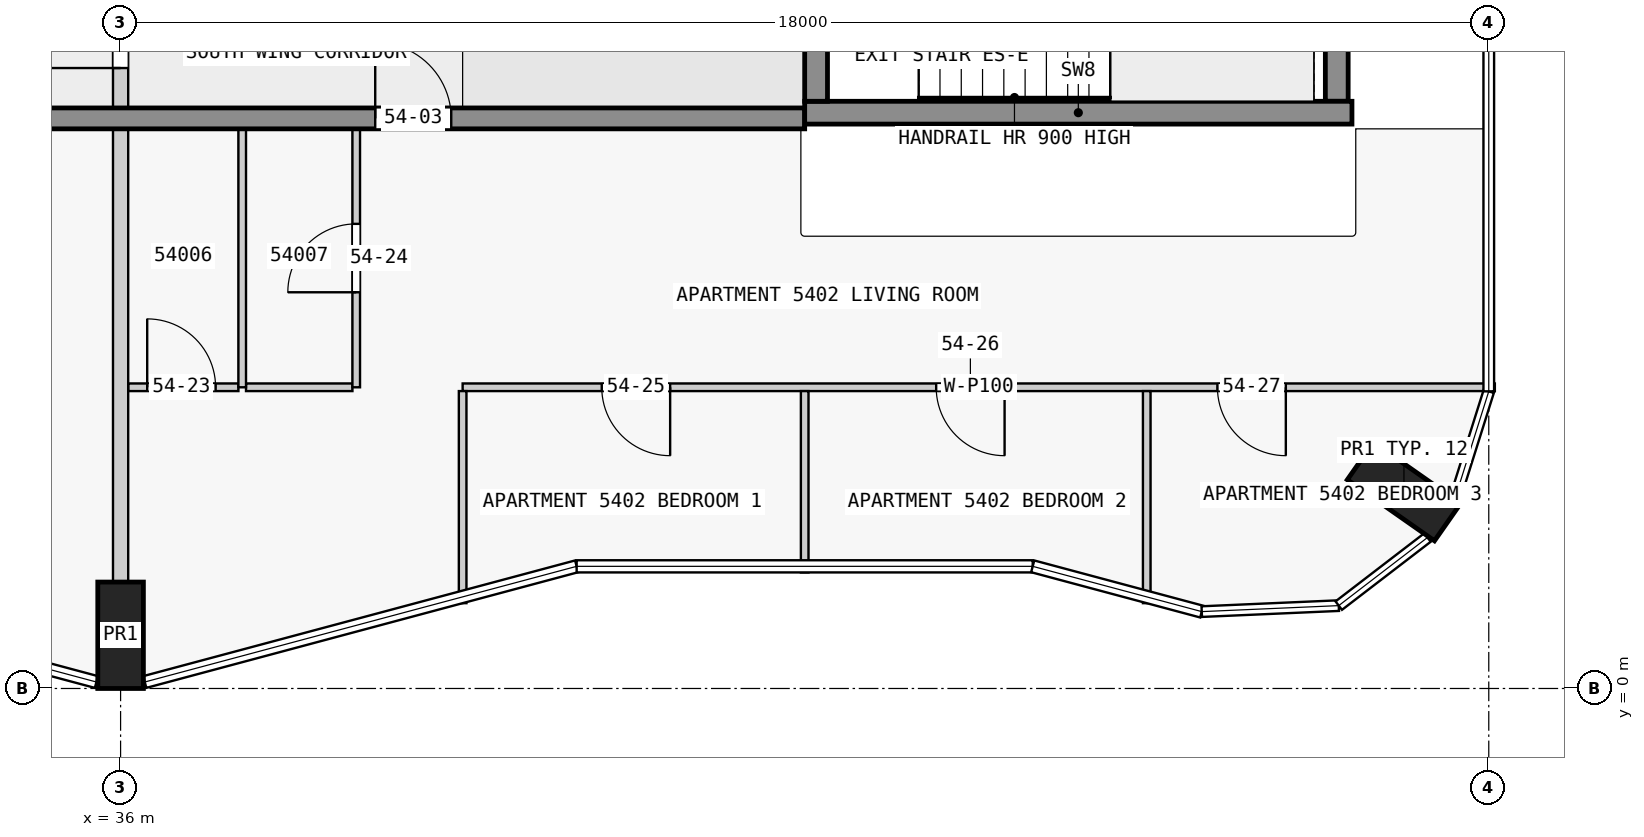
"""IFC4 building model, lengths in metres.
Left out: names, types, materials, properties, quantities, classifications, styles, units other than length and angle.
Written with IfcOpenShell. Run it as: python <this file> out.ifc"""

import sys

from ifc_helpers import new_model, si_unit, direction, frame, frame_2d, origin, origin_2d, place, context, subcontext, project, spatial, rectangle, extrude, element, fill, save


model = new_model("IFC4")
c1 = context("Model", 3, precision=1e-05, world=origin(), true_north=direction((0.0, 1.0)))
c2 = subcontext(c1, "Body", "Model", "MODEL_VIEW")
j1 = project(units=[si_unit("LENGTHUNIT", "METRE"), si_unit("PLANEANGLEUNIT", "RADIAN")], contexts=[c1])
p1 = place(None, origin())
s1 = spatial("IfcSite", under=j1, at=p1, CompositionType="ELEMENT")
p2 = place(p1, origin())
s2 = spatial("IfcBuilding", under=s1, at=p2, CompositionType="ELEMENT")
p3 = place(p2, frame((0.0, 0.0, 208.4)))
s3 = spatial("IfcBuildingStorey", under=s2, at=p3, CompositionType="ELEMENT", Elevation=208.4)
for number, where, z_axis, x_axis in (
    (1, (36.0, 0.7, 0.0), (0.0, 0.0, 1.0), (1.0, 0.0, 0.0)),
    (2, (52.884, 2.59, 0.0), (0.0, 0.0, 1.0), (0.574, 0.819, 0.0)),
):
    element("IfcColumn", number, at=place(p3, frame(where, z_axis=z_axis, x_axis=x_axis)), inside=s3, PredefinedType="COLUMN", context=c2, shape_type="SweptSolid", body=[
        extrude(rectangle(XDim=0.6, YDim=1.4, at=origin_2d()), origin(), (0.0, 0.0, 1.0), 3.5),
    ])
p4 = place(p3, frame((45.15, 7.725, 0.0), z_axis=(0.0, 0.0, 1.0), x_axis=(0.0, 1.0, 0.0)))
e3 = element("IfcWall", 3, at=p4, inside=s3, PredefinedType="SHEAR", context=c2, shape_type="SweptSolid", body=[
    extrude(rectangle(XDim=2.55, YDim=0.3, at=frame_2d((1.275, 0.0))), origin(), (0.0, 0.0, 1.0), 3.5),
])
p5 = place(p4, frame((0.725, 0.0, 0.0)))
e4 = element("IfcOpeningElement", 4, at=p5, cuts=e3, PredefinedType="OPENING", context=c2, shape_type="SweptSolid", body=[
    extrude(rectangle(XDim=1.1, YDim=2.1, at=frame_2d((0.55, 1.05))), frame((0.0, 0.16, 0.0), z_axis=(0.0, -1.0, 0.0), x_axis=(1.0, 0.0, 0.0)), (0.0, 0.0, 1.0), 0.32),
])
p6 = place(p3, frame((52.0, 7.725, 0.0), z_axis=(0.0, 0.0, 1.0), x_axis=(0.0, 1.0, 0.0)))
e5 = element("IfcWall", 5, at=p6, inside=s3, PredefinedType="SHEAR", context=c2, shape_type="SweptSolid", body=[
    extrude(rectangle(XDim=2.55, YDim=0.3, at=frame_2d((1.275, 0.0))), origin(), (0.0, 0.0, 1.0), 3.5),
])
p7 = place(p3, frame((45.0, 7.575, 0.0), z_axis=(0.0, 0.0, 1.0), x_axis=(1.0, 0.0, 0.0)))
e6 = element("IfcWall", 6, at=p7, inside=s3, PredefinedType="SHEAR", context=c2, shape_type="SweptSolid", body=[
    extrude(rectangle(XDim=7.2, YDim=0.3, at=frame_2d((3.6, 0.0))), origin(), (0.0, 0.0, 1.0), 3.5),
])
p8 = place(p3, frame((22.5, 7.5, 0.0), z_axis=(0.0, 0.0, 1.0), x_axis=(1.0, 0.0, 0.0)))
e7 = element("IfcWall", 7, at=p8, inside=s3, PredefinedType="SHEAR", context=c2, shape_type="SweptSolid", body=[
    extrude(rectangle(XDim=22.5, YDim=0.275, at=frame_2d((11.25, 0.0))), origin(), (0.0, 0.0, 1.0), 3.25),
])
p9 = place(p8, frame((4.05, 0.0, 0.0)))
e8 = element("IfcOpeningElement", 8, at=p9, cuts=e7, PredefinedType="OPENING", context=c2, shape_type="SweptSolid", body=[
    extrude(rectangle(XDim=1.0, YDim=2.1, at=frame_2d((0.5, 1.05))), frame((0.0, 0.147, 0.0), z_axis=(0.0, -1.0, 0.0), x_axis=(1.0, 0.0, 0.0)), (0.0, 0.0, 1.0), 0.295),
])
p10 = place(p8, frame((10.35, 0.0, 0.0)))
e9 = element("IfcOpeningElement", 9, at=p10, cuts=e7, PredefinedType="OPENING", context=c2, shape_type="SweptSolid", body=[
    extrude(rectangle(XDim=1.8, YDim=2.1, at=frame_2d((0.9, 1.05))), frame((0.0, 0.147, 0.0), z_axis=(0.0, -1.0, 0.0), x_axis=(1.0, 0.0, 0.0)), (0.0, 0.0, 1.0), 0.295),
])
p11 = place(p8, frame((16.85, 0.0, 0.0)))
e10 = element("IfcOpeningElement", 10, at=p11, cuts=e7, PredefinedType="OPENING", context=c2, shape_type="SweptSolid", body=[
    extrude(rectangle(XDim=1.0, YDim=2.1, at=frame_2d((0.5, 1.05))), frame((0.0, 0.147, 0.0), z_axis=(0.0, -1.0, 0.0), x_axis=(1.0, 0.0, 0.0)), (0.0, 0.0, 1.0), 0.295),
])
p12 = place(p3, frame((54.08, 3.962, 0.0), z_axis=(0.0, 0.0, 1.0), x_axis=(-1.0, 0.0, 0.0)))
e11 = element("IfcWall", 11, at=p12, inside=s3, PredefinedType="PARTITIONING", context=c2, shape_type="SweptSolid", body=[
    extrude(rectangle(XDim=13.58, YDim=0.1, at=frame_2d((6.79, 0.0))), origin(), (0.0, 0.0, 1.0), 3.25),
])
p13 = place(p12, frame((10.85, 0.0, 0.0)))
e12 = element("IfcOpeningElement", 12, at=p13, cuts=e11, PredefinedType="OPENING", context=c2, shape_type="SweptSolid", body=[
    extrude(rectangle(XDim=0.9, YDim=2.1, at=frame_2d((0.45, 1.05))), frame((0.0, 0.06, 0.0), z_axis=(0.0, -1.0, 0.0), x_axis=(1.0, 0.0, 0.0)), (0.0, 0.0, 1.0), 0.12),
])
p14 = place(p12, frame((6.45, 0.0, 0.0)))
e13 = element("IfcOpeningElement", 13, at=p14, cuts=e11, PredefinedType="OPENING", context=c2, shape_type="SweptSolid", body=[
    extrude(rectangle(XDim=0.9, YDim=2.1, at=frame_2d((0.45, 1.05))), frame((0.0, 0.06, 0.0), z_axis=(0.0, -1.0, 0.0), x_axis=(1.0, 0.0, 0.0)), (0.0, 0.0, 1.0), 0.12),
])
p15 = place(p12, frame((2.75, 0.0, 0.0)))
e14 = element("IfcOpeningElement", 14, at=p15, cuts=e11, PredefinedType="OPENING", context=c2, shape_type="SweptSolid", body=[
    extrude(rectangle(XDim=0.9, YDim=2.1, at=frame_2d((0.45, 1.05))), frame((0.0, 0.06, 0.0), z_axis=(0.0, -1.0, 0.0), x_axis=(1.0, 0.0, 0.0)), (0.0, 0.0, 1.0), 0.12),
])
p16 = place(p3, frame((36.1, 3.962, 0.0), z_axis=(0.0, 0.0, 1.0), x_axis=(1.0, 0.0, 0.0)))
e15 = element("IfcWall", 15, at=p16, inside=s3, PredefinedType="PARTITIONING", context=c2, shape_type="SweptSolid", body=[
    extrude(rectangle(XDim=1.45, YDim=0.1, at=frame_2d((0.725, 0.0))), origin(), (0.0, 0.0, 1.0), 3.25),
])
p17 = place(p16, frame((0.25, 0.0, 0.0)))
e16 = element("IfcOpeningElement", 16, at=p17, cuts=e15, PredefinedType="OPENING", context=c2, shape_type="SweptSolid", body=[
    extrude(rectangle(XDim=0.9, YDim=2.1, at=frame_2d((0.45, 1.05))), frame((0.0, 0.06, 0.0), z_axis=(0.0, -1.0, 0.0), x_axis=(1.0, 0.0, 0.0)), (0.0, 0.0, 1.0), 0.12),
])
p18 = place(p3, frame((37.65, 3.962, 0.0), z_axis=(0.0, 0.0, 1.0), x_axis=(1.0, 0.0, 0.0)))
e17 = element("IfcWall", 17, at=p18, inside=s3, PredefinedType="PARTITIONING", context=c2, shape_type="SweptSolid", body=[
    extrude(rectangle(XDim=1.4, YDim=0.1, at=frame_2d((0.7, 0.0))), origin(), (0.0, 0.0, 1.0), 3.25),
])
p19 = place(p3, frame((36.0, 1.4, 0.0), z_axis=(0.0, 0.0, 1.0), x_axis=(0.0, 1.0, 0.0)))
e18 = element("IfcWall", 18, at=p19, inside=s3, PredefinedType="PARTITIONING", context=c2, shape_type="SweptSolid", body=[
    extrude(rectangle(XDim=5.963, YDim=0.2, at=frame_2d((2.981, 0.0))), origin(), (0.0, 0.0, 1.0), 3.25),
])
p20 = place(p3, frame((37.6, 3.962, 0.0), z_axis=(0.0, 0.0, 1.0), x_axis=(0.0, 1.0, 0.0)))
e19 = element("IfcWall", 19, at=p20, inside=s3, PredefinedType="PARTITIONING", context=c2, shape_type="SweptSolid", body=[
    extrude(rectangle(XDim=3.4, YDim=0.1, at=frame_2d((1.7, 0.0))), origin(), (0.0, 0.0, 1.0), 3.25),
])
p21 = place(p3, frame((39.1, 3.962, 0.0), z_axis=(0.0, 0.0, 1.0), x_axis=(0.0, 1.0, 0.0)))
e20 = element("IfcWall", 20, at=p21, inside=s3, PredefinedType="PARTITIONING", context=c2, shape_type="SweptSolid", body=[
    extrude(rectangle(XDim=3.4, YDim=0.1, at=frame_2d((1.7, 0.0))), origin(), (0.0, 0.0, 1.0), 3.25),
])
p22 = place(p21, frame((1.25, 0.0, 0.0)))
e21 = element("IfcOpeningElement", 21, at=p22, cuts=e20, PredefinedType="OPENING", context=c2, shape_type="SweptSolid", body=[
    extrude(rectangle(XDim=0.9, YDim=2.1, at=frame_2d((0.45, 1.05))), frame((0.0, 0.06, 0.0), z_axis=(0.0, -1.0, 0.0), x_axis=(1.0, 0.0, 0.0)), (0.0, 0.0, 1.0), 0.12),
])
p23 = place(p3, frame((40.5, 3.913, 0.0), z_axis=(0.0, 0.0, 1.0), x_axis=(0.0, -1.0, 0.0)))
e22 = element("IfcWall", 22, at=p23, inside=s3, PredefinedType="PARTITIONING", context=c2, shape_type="SweptSolid", body=[
    extrude(rectangle(XDim=2.79, YDim=0.1, at=frame_2d((1.395, 0.0))), origin(), (0.0, 0.0, 1.0), 3.25),
])
p24 = place(p3, frame((45.0, 1.527, 0.0), z_axis=(0.0, 0.0, 1.0), x_axis=(0.0, 1.0, 0.0)))
e23 = element("IfcWall", 23, at=p24, inside=s3, PredefinedType="PARTITIONING", context=c2, shape_type="SweptSolid", body=[
    extrude(rectangle(XDim=2.386, YDim=0.1, at=frame_2d((1.193, 0.0))), origin(), (0.0, 0.0, 1.0), 3.25),
])
p25 = place(p3, frame((49.5, 1.122, 0.0), z_axis=(0.0, 0.0, 1.0), x_axis=(0.0, 1.0, 0.0)))
e24 = element("IfcWall", 24, at=p25, inside=s3, PredefinedType="PARTITIONING", context=c2, shape_type="SweptSolid", body=[
    extrude(rectangle(XDim=2.79, YDim=0.1, at=frame_2d((1.395, 0.0))), origin(), (0.0, 0.0, 1.0), 3.25),
])
p26 = place(p3, frame((36.0, 7.462, 0.0), z_axis=(0.0, 0.0, 1.0), x_axis=(0.0, 1.0, 0.0)))
e25 = element("IfcWall", 25, at=p26, inside=s3, PredefinedType="PARTITIONING", context=c2, shape_type="SweptSolid", body=[
    extrude(rectangle(XDim=3.175, YDim=0.2, at=frame_2d((1.587, 0.0))), origin(), (0.0, 0.0, 1.0), 3.25),
])
p27 = place(p26, frame((0.7, 0.0, 0.0)))
e26 = element("IfcOpeningElement", 26, at=p27, cuts=e25, PredefinedType="OPENING", context=c2, shape_type="SweptSolid", body=[
    extrude(rectangle(XDim=1.8, YDim=2.1, at=frame_2d((0.9, 1.05))), frame((0.0, 0.11, 0.0), z_axis=(0.0, -1.0, 0.0), x_axis=(1.0, 0.0, 0.0)), (0.0, 0.0, 1.0), 0.22),
])
p28 = place(p11, origin())
e27 = element("IfcDoor", 27, at=p28, inside=s3, OperationType="SINGLE_SWING_RIGHT", PredefinedType="DOOR", context=c2, shape_type="SweptSolid", body=[
    extrude(rectangle(XDim=1.0, YDim=2.1, at=frame_2d((0.5, 1.05))), frame((0.0, 0.025, 0.0), z_axis=(0.0, -1.0, 0.0), x_axis=(1.0, 0.0, 0.0)), (0.0, 0.0, 1.0), 0.05),
])
fill(e10, e27)
p29 = place(p27, origin())
e28 = element("IfcDoor", 28, at=p29, inside=s3, OperationType="SINGLE_SWING_RIGHT", PredefinedType="DOOR", context=c2, shape_type="SweptSolid", body=[
    extrude(rectangle(XDim=1.8, YDim=2.1, at=frame_2d((0.9, 1.05))), frame((0.0, 0.025, 0.0), z_axis=(0.0, -1.0, 0.0), x_axis=(1.0, 0.0, 0.0)), (0.0, 0.0, 1.0), 0.05),
])
fill(e26, e28)
p30 = place(p17, origin())
e29 = element("IfcDoor", 29, at=p30, inside=s3, OperationType="SINGLE_SWING_LEFT", PredefinedType="DOOR", context=c2, shape_type="SweptSolid", body=[
    extrude(rectangle(XDim=0.9, YDim=2.1, at=frame_2d((0.45, 1.05))), frame((0.0, 0.025, 0.0), z_axis=(0.0, -1.0, 0.0), x_axis=(1.0, 0.0, 0.0)), (0.0, 0.0, 1.0), 0.05),
])
fill(e16, e29)
p31 = place(p22, origin())
e30 = element("IfcDoor", 30, at=p31, inside=s3, OperationType="SINGLE_SWING_LEFT", PredefinedType="DOOR", context=c2, shape_type="SweptSolid", body=[
    extrude(rectangle(XDim=0.9, YDim=2.1, at=frame_2d((0.45, 1.05))), frame((0.0, 0.025, 0.0), z_axis=(0.0, -1.0, 0.0), x_axis=(1.0, 0.0, 0.0)), (0.0, 0.0, 1.0), 0.05),
])
fill(e21, e30)
p32 = place(p13, origin())
e31 = element("IfcDoor", 31, at=p32, inside=s3, OperationType="SINGLE_SWING_RIGHT", PredefinedType="DOOR", context=c2, shape_type="SweptSolid", body=[
    extrude(rectangle(XDim=0.9, YDim=2.1, at=frame_2d((0.45, 1.05))), frame((0.0, 0.025, 0.0), z_axis=(0.0, -1.0, 0.0), x_axis=(1.0, 0.0, 0.0)), (0.0, 0.0, 1.0), 0.05),
])
fill(e12, e31)
p33 = place(p14, origin())
e32 = element("IfcDoor", 32, at=p33, inside=s3, OperationType="SINGLE_SWING_RIGHT", PredefinedType="DOOR", context=c2, shape_type="SweptSolid", body=[
    extrude(rectangle(XDim=0.9, YDim=2.1, at=frame_2d((0.45, 1.05))), frame((0.0, 0.025, 0.0), z_axis=(0.0, -1.0, 0.0), x_axis=(1.0, 0.0, 0.0)), (0.0, 0.0, 1.0), 0.05),
])
fill(e13, e32)
p34 = place(p15, origin())
e33 = element("IfcDoor", 33, at=p34, inside=s3, OperationType="SINGLE_SWING_LEFT", PredefinedType="DOOR", context=c2, shape_type="SweptSolid", body=[
    extrude(rectangle(XDim=0.9, YDim=2.1, at=frame_2d((0.45, 1.05))), frame((0.0, 0.025, 0.0), z_axis=(0.0, -1.0, 0.0), x_axis=(1.0, 0.0, 0.0)), (0.0, 0.0, 1.0), 0.05),
])
fill(e14, e33)
save(model, sys.argv[1])
